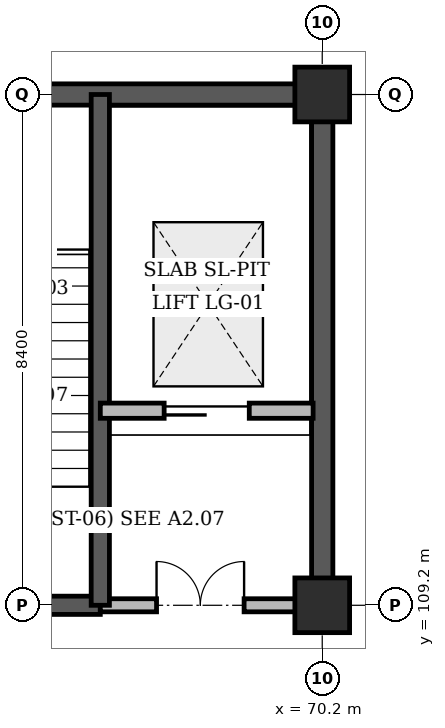
"""IFC4 building model, lengths in metres.
Left out: names, types, materials, properties, quantities, classifications, styles, units other than length and angle.
Written with IfcOpenShell. Run it as: python <this file> out.ifc"""

import sys

from ifc_helpers import new_model, si_unit, direction, frame, frame_2d, origin, origin_2d, place, context, subcontext, project, spatial, rectangle, extrude, element, fill, save


model = new_model("IFC4")
c1 = context("Model", 3, precision=1e-05, world=origin(), true_north=direction((0.0, 1.0)))
c2 = subcontext(c1, "Body", "Model", "MODEL_VIEW")
j1 = project(units=[si_unit("LENGTHUNIT", "METRE"), si_unit("PLANEANGLEUNIT", "RADIAN")], contexts=[c1])
p1 = place(None, origin())
s1 = spatial("IfcSite", under=j1, at=p1, CompositionType="ELEMENT")
p2 = place(p1, origin())
s2 = spatial("IfcBuilding", under=s1, at=p2, CompositionType="ELEMENT")
p3 = place(p2, frame((0.0, 0.0, -4.8)))
s3 = spatial("IfcBuildingStorey", under=s2, at=p3, CompositionType="ELEMENT", Elevation=-4.8)
p4 = place(p3, frame((62.225, 117.6, 0.0), z_axis=(0.0, 0.0, 1.0), x_axis=(1.0, 0.0, 0.0)))
e1 = element("IfcWall", 1, at=p4, inside=s3, PredefinedType="SHEAR", context=c2, shape_type="SweptSolid", body=[
    extrude(rectangle(XDim=8.15, YDim=0.35, at=frame_2d((4.075, 0.0))), origin(), (0.0, 0.0, 1.0), 4.4),
])
p5 = place(p3, frame((70.2, 109.2, 0.0), z_axis=(0.0, 0.0, 1.0), x_axis=(0.0, 1.0, 0.0)))
e2 = element("IfcWall", 2, at=p5, inside=s3, PredefinedType="SHEAR", context=c2, shape_type="SweptSolid", body=[
    extrude(rectangle(XDim=8.4, YDim=0.35, at=frame_2d((4.2, 0.0))), origin(), (0.0, 0.0, 1.0), 4.4),
])
for number, where, z_axis, x_axis in (
    (3, (70.2, 109.2, 0.0), (0.0, 0.0, 1.0), (1.0, 0.0, 0.0)),
    (4, (70.2, 117.6, 0.0), (0.0, 0.0, 1.0), (1.0, 0.0, 0.0)),
):
    element("IfcColumn", number, at=place(p3, frame(where, z_axis=z_axis, x_axis=x_axis)), inside=s3, PredefinedType="COLUMN", context=c2, shape_type="SweptSolid", body=[
        extrude(rectangle(XDim=0.9, YDim=0.9, at=origin_2d()), origin(), (0.0, 0.0, 1.0), 4.8),
    ])
p6 = place(p3, frame((62.4, 109.2, 0.0), z_axis=(0.0, 0.0, 1.0), x_axis=(1.0, 0.0, 0.0)))
e5 = element("IfcWall", 5, at=p6, inside=s3, PredefinedType="SHEAR", context=c2, shape_type="SweptSolid", body=[
    extrude(rectangle(XDim=4.15, YDim=0.3, at=frame_2d((2.075, 0.0))), origin(), (0.0, 0.0, 1.0), 4.8),
])
p7 = place(p6, frame((1.515, 0.0, 0.0)))
e6 = element("IfcOpeningElement", 6, at=p7, cuts=e5, PredefinedType="OPENING", context=c2, shape_type="SweptSolid", body=[
    extrude(rectangle(XDim=1.12, YDim=2.15, at=frame_2d((0.56, 1.075))), frame((0.0, 0.16, 0.0), z_axis=(0.0, -1.0, 0.0), x_axis=(1.0, 0.0, 0.0)), (0.0, 0.0, 1.0), 0.32),
])
p8 = place(p3, frame((66.55, 109.2, 0.0), z_axis=(0.0, 0.0, 1.0), x_axis=(1.0, 0.0, 0.0)))
e7 = element("IfcWall", 7, at=p8, inside=s3, PredefinedType="STANDARD", context=c2, shape_type="SweptSolid", body=[
    extrude(rectangle(XDim=3.29, YDim=0.215, at=frame_2d((1.645, 0.0))), origin(), (0.0, 0.0, 1.0), 3.53),
])
p9 = place(p8, frame((0.925, 0.0, 0.0)))
e8 = element("IfcOpeningElement", 8, at=p9, cuts=e7, PredefinedType="OPENING", context=c2, shape_type="SweptSolid", body=[
    extrude(rectangle(XDim=1.44, YDim=2.2, at=frame_2d((0.72, 1.1))), frame((0.0, 0.118, 0.0), z_axis=(0.0, -1.0, 0.0), x_axis=(1.0, 0.0, 0.0)), (0.0, 0.0, 1.0), 0.235),
])
p10 = place(p3, frame((66.55, 109.2, 0.0), z_axis=(0.0, 0.0, 1.0), x_axis=(0.0, 1.0, 0.0)))
e9 = element("IfcWall", 9, at=p10, inside=s3, PredefinedType="SHEAR", context=c2, shape_type="SweptSolid", body=[
    extrude(rectangle(XDim=8.4, YDim=0.3, at=frame_2d((4.2, 0.0))), origin(), (0.0, 0.0, 1.0), 4.8),
])
p11 = place(p3, frame((66.55, 112.4, 0.0), z_axis=(0.0, 0.0, 1.0), x_axis=(1.0, 0.0, 0.0)))
e10 = element("IfcWall", 10, at=p11, inside=s3, PredefinedType="STANDARD", context=c2, shape_type="SweptSolid", body=[
    extrude(rectangle(XDim=3.5, YDim=0.25, at=frame_2d((1.75, 0.0))), origin(), (0.0, 0.0, 1.0), 4.46),
])
p12 = place(p11, frame((1.05, 0.0, 0.0)))
e11 = element("IfcOpeningElement", 11, at=p12, cuts=e10, PredefinedType="OPENING", context=c2, shape_type="SweptSolid", body=[
    extrude(rectangle(XDim=1.4, YDim=2.2, at=frame_2d((0.7, 1.1))), frame((0.0, 0.135, 0.0), z_axis=(0.0, -1.0, 0.0), x_axis=(1.0, 0.0, 0.0)), (0.0, 0.0, 1.0), 0.27),
])
p13 = place(p9, origin())
e12 = element("IfcDoor", 12, at=p13, inside=s3, OperationType="DOUBLE_DOOR_SINGLE_SWING", PredefinedType="DOOR", context=c2, shape_type="SweptSolid", body=[
    extrude(rectangle(XDim=1.44, YDim=2.2, at=frame_2d((0.72, 1.1))), frame((0.0, 0.025, 0.0), z_axis=(0.0, -1.0, 0.0), x_axis=(1.0, 0.0, 0.0)), (0.0, 0.0, 1.0), 0.05),
])
fill(e8, e12)
p14 = place(p12, origin())
e13 = element("IfcDoor", 13, at=p14, inside=s3, OperationType="SLIDING_TO_LEFT", PredefinedType="DOOR", context=c2, shape_type="SweptSolid", body=[
    extrude(rectangle(XDim=1.4, YDim=2.2, at=frame_2d((0.7, 1.1))), frame((0.0, 0.025, 0.0), z_axis=(0.0, -1.0, 0.0), x_axis=(1.0, 0.0, 0.0)), (0.0, 0.0, 1.0), 0.05),
])
fill(e11, e13)
save(model, sys.argv[1])
